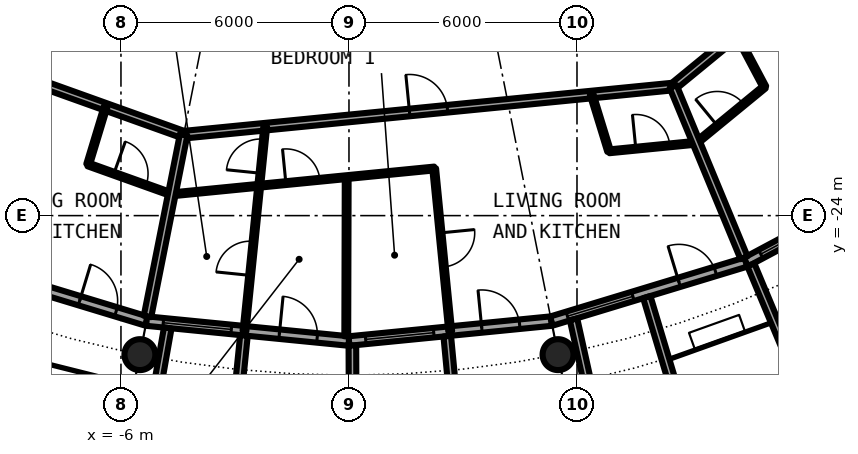
"""IFC4 building model, lengths in metres.
Left out: names, types, materials, properties, quantities, classifications, styles, units other than length and angle.
Written with IfcOpenShell. Run it as: python <this file> out.ifc"""

import sys

from ifc_helpers import new_model, si_unit, direction, frame, frame_2d, origin, origin_2d, place, context, subcontext, project, spatial, rectangle, hollow_circle, extrude, element, fill, save


model = new_model("IFC4")
c1 = context("Model", 3, precision=1e-05, world=origin(), true_north=direction((0.0, 1.0)))
c2 = subcontext(c1, "Body", "Model", "MODEL_VIEW")
j1 = project(units=[si_unit("LENGTHUNIT", "METRE"), si_unit("PLANEANGLEUNIT", "RADIAN")], contexts=[c1])
p1 = place(None, origin())
s1 = spatial("IfcSite", under=j1, at=p1, CompositionType="ELEMENT")
p2 = place(p1, origin())
s2 = spatial("IfcBuilding", under=s1, at=p2, CompositionType="ELEMENT")
p3 = place(p2, frame((0.0, 0.0, 202.4)))
s3 = spatial("IfcBuildingStorey", under=s2, at=p3, CompositionType="ELEMENT", Elevation=202.4)
for number, where, z_axis, x_axis in (
    (1, (-5.501, -27.658, 0.0), (0.0, 0.0, 1.0), (1.0, 0.0, 0.0)),
    (2, (5.501, -27.658, 0.0), (0.0, 0.0, 1.0), (1.0, 0.0, 0.0)),
):
    element("IfcColumn", number, at=place(p3, frame(where, z_axis=z_axis, x_axis=x_axis)), inside=s3, PredefinedType="COLUMN", context=c2, shape_type="SweptSolid", body=[
        extrude(hollow_circle(Radius=0.406, WallThickness=0.03, at=origin_2d()), origin(), (0.0, 0.0, 1.0), 3.05),
    ])
p4 = place(p3, frame((-10.447, -25.222, 0.0), z_axis=(0.0, 0.0, 1.0), x_axis=(0.956965678721, -0.290201119486, 0.0)))
e3 = element("IfcWall", 3, at=p4, inside=s3, PredefinedType="SOLIDWALL", context=c2, shape_type="SweptSolid", body=[
    extrude(rectangle(XDim=5.351, YDim=0.25, at=frame_2d((2.676, 0.0))), origin(), (0.0, 0.0, 1.0), 2.7),
])
p5 = place(p4, frame((0.441, 0.0, 0.3)))
e4 = element("IfcOpeningElement", 4, at=p5, cuts=e3, PredefinedType="OPENING", context=c2, shape_type="SweptSolid", body=[
    extrude(rectangle(XDim=1.8, YDim=2.1, at=frame_2d((0.9, 1.05))), frame((0.0, 0.135, 0.0), z_axis=(0.0, -1.0, 0.0), x_axis=(1.0, 0.0, 0.0)), (0.0, 0.0, 1.0), 0.27),
])
p6 = place(p4, frame((3.51, 0.0, 0.0)))
e5 = element("IfcOpeningElement", 5, at=p6, cuts=e3, PredefinedType="OPENING", context=c2, shape_type="SweptSolid", body=[
    extrude(rectangle(XDim=1.0, YDim=2.2, at=frame_2d((0.5, 1.1))), frame((0.0, 0.135, 0.0), z_axis=(0.0, -1.0, 0.0), x_axis=(1.0, 0.0, 0.0)), (0.0, 0.0, 1.0), 0.27),
])
p7 = place(p3, frame((-5.326, -26.775, 0.0), z_axis=(0.0, 0.0, 1.0), x_axis=(0.995173996315, -0.098126026407, 0.0)))
e6 = element("IfcWall", 6, at=p7, inside=s3, PredefinedType="SOLIDWALL", context=c2, shape_type="SweptSolid", body=[
    extrude(rectangle(XDim=5.352, YDim=0.25, at=frame_2d((2.676, 0.0))), origin(), (0.0, 0.0, 1.0), 2.7),
])
p8 = place(p7, frame((0.441, 0.0, 0.3)))
e7 = element("IfcOpeningElement", 7, at=p8, cuts=e6, PredefinedType="OPENING", context=c2, shape_type="SweptSolid", body=[
    extrude(rectangle(XDim=1.8, YDim=2.1, at=frame_2d((0.9, 1.05))), frame((0.0, 0.135, 0.0), z_axis=(0.0, -1.0, 0.0), x_axis=(1.0, 0.0, 0.0)), (0.0, 0.0, 1.0), 0.27),
])
p9 = place(p7, frame((3.51, 0.0, 0.0)))
e8 = element("IfcOpeningElement", 8, at=p9, cuts=e6, PredefinedType="OPENING", context=c2, shape_type="SweptSolid", body=[
    extrude(rectangle(XDim=1.0, YDim=2.2, at=frame_2d((0.5, 1.1))), frame((0.0, 0.135, 0.0), z_axis=(0.0, -1.0, 0.0), x_axis=(1.0, 0.0, 0.0)), (0.0, 0.0, 1.0), 0.27),
])
p10 = place(p3, frame((-4.769, -26.956, -0.03), z_axis=(0.0, 0.0, 1.0), x_axis=(-0.174056778901, -0.984735618183, 0.0)))
e9 = element("IfcWall", 9, at=p10, inside=s3, PredefinedType="SOLIDWALL", context=c2, shape_type="SweptSolid", body=[
    extrude(rectangle(XDim=2.925, YDim=0.2, at=frame_2d((1.462, 0.0))), origin(), (0.0, 0.0, 1.0), 2.73),
])
p11 = place(p3, frame((-2.764, -27.153, -0.03), z_axis=(0.0, 0.0, 1.0), x_axis=(-0.101505487237, -0.994834979311, 0.0)))
e10 = element("IfcWall", 10, at=p11, inside=s3, PredefinedType="SOLIDWALL", context=c2, shape_type="SweptSolid", body=[
    extrude(rectangle(XDim=3.007, YDim=0.2, at=frame_2d((1.503, 0.0))), origin(), (0.0, 0.0, 1.0), 2.73),
])
p12 = place(p3, frame((0.0, -27.3, 0.0), z_axis=(0.0, 0.0, 1.0), x_axis=(0.995173996315, 0.098126026407, 0.0)))
e11 = element("IfcWall", 11, at=p12, inside=s3, PredefinedType="SOLIDWALL", context=c2, shape_type="SweptSolid", body=[
    extrude(rectangle(XDim=5.352, YDim=0.25, at=frame_2d((2.676, 0.0))), origin(), (0.0, 0.0, 1.0), 2.7),
])
p13 = place(p12, frame((0.441, 0.0, 0.3)))
e12 = element("IfcOpeningElement", 12, at=p13, cuts=e11, PredefinedType="OPENING", context=c2, shape_type="SweptSolid", body=[
    extrude(rectangle(XDim=1.8, YDim=2.1, at=frame_2d((0.9, 1.05))), frame((0.0, 0.135, 0.0), z_axis=(0.0, -1.0, 0.0), x_axis=(1.0, 0.0, 0.0)), (0.0, 0.0, 1.0), 0.27),
])
p14 = place(p12, frame((3.51, 0.0, 0.0)))
e13 = element("IfcOpeningElement", 13, at=p14, cuts=e11, PredefinedType="OPENING", context=c2, shape_type="SweptSolid", body=[
    extrude(rectangle(XDim=1.0, YDim=2.2, at=frame_2d((0.5, 1.1))), frame((0.0, 0.135, 0.0), z_axis=(0.0, -1.0, 0.0), x_axis=(1.0, 0.0, 0.0)), (0.0, 0.0, 1.0), 0.27),
])
p15 = place(p3, frame((0.09, -27.417, -0.03), z_axis=(0.0, 0.0, 1.0), x_axis=(0.00347308367, -0.999993968827, 0.0)))
e14 = element("IfcWall", 14, at=p15, inside=s3, PredefinedType="SOLIDWALL", context=c2, shape_type="SweptSolid", body=[
    extrude(rectangle(XDim=2.882, YDim=0.2, at=frame_2d((1.441, 0.0))), origin(), (0.0, 0.0, 1.0), 2.73),
])
p16 = place(p3, frame((2.586, -27.171, -0.03), z_axis=(0.0, 0.0, 1.0), x_axis=(0.094548432284, -0.995520262954, 0.0)))
e15 = element("IfcWall", 15, at=p16, inside=s3, PredefinedType="SOLIDWALL", context=c2, shape_type="SweptSolid", body=[
    extrude(rectangle(XDim=3.006, YDim=0.2, at=frame_2d((1.503, 0.0))), origin(), (0.0, 0.0, 1.0), 2.73),
])
p17 = place(p3, frame((5.326, -26.775, 0.0), z_axis=(0.0, 0.0, 1.0), x_axis=(0.956965678721, 0.290201119486, 0.0)))
e16 = element("IfcWall", 16, at=p17, inside=s3, PredefinedType="SOLIDWALL", context=c2, shape_type="SweptSolid", body=[
    extrude(rectangle(XDim=5.351, YDim=0.25, at=frame_2d((2.676, 0.0))), origin(), (0.0, 0.0, 1.0), 2.7),
])
p18 = place(p17, frame((0.441, 0.0, 0.3)))
e17 = element("IfcOpeningElement", 17, at=p18, cuts=e16, PredefinedType="OPENING", context=c2, shape_type="SweptSolid", body=[
    extrude(rectangle(XDim=1.8, YDim=2.1, at=frame_2d((0.9, 1.05))), frame((0.0, 0.135, 0.0), z_axis=(0.0, -1.0, 0.0), x_axis=(1.0, 0.0, 0.0)), (0.0, 0.0, 1.0), 0.27),
])
p19 = place(p17, frame((3.51, 0.0, 0.0)))
e18 = element("IfcOpeningElement", 18, at=p19, cuts=e16, PredefinedType="OPENING", context=c2, shape_type="SweptSolid", body=[
    extrude(rectangle(XDim=1.0, YDim=2.2, at=frame_2d((0.5, 1.1))), frame((0.0, 0.135, 0.0), z_axis=(0.0, -1.0, 0.0), x_axis=(1.0, 0.0, 0.0)), (0.0, 0.0, 1.0), 0.27),
])
p20 = place(p3, frame((5.909, -26.729, -0.03), z_axis=(0.0, 0.0, 1.0), x_axis=(0.216409053917, -0.976302781612, 0.0)))
e19 = element("IfcWall", 19, at=p20, inside=s3, PredefinedType="SOLIDWALL", context=c2, shape_type="SweptSolid", body=[
    extrude(rectangle(XDim=2.925, YDim=0.2, at=frame_2d((1.463, 0.0))), origin(), (0.0, 0.0, 1.0), 2.73),
])
p21 = place(p3, frame((7.837, -26.144, -0.03), z_axis=(0.0, 0.0, 1.0), x_axis=(0.287064767992, -0.957911174889, 0.0)))
e20 = element("IfcWall", 20, at=p21, inside=s3, PredefinedType="SOLIDWALL", context=c2, shape_type="SweptSolid", body=[
    extrude(rectangle(XDim=3.006, YDim=0.2, at=frame_2d((1.503, 0.0))), origin(), (0.0, 0.0, 1.0), 2.73),
])
p22 = place(p3, frame((10.447, -25.222, 0.0), z_axis=(0.0, 0.0, 1.0), x_axis=(0.881915646801, 0.471407246368, 0.0)))
e21 = element("IfcWall", 21, at=p22, inside=s3, PredefinedType="SOLIDWALL", context=c2, shape_type="SweptSolid", body=[
    extrude(rectangle(XDim=5.352, YDim=0.25, at=frame_2d((2.676, 0.0))), origin(), (0.0, 0.0, 1.0), 2.7),
])
p23 = place(p22, frame((0.441, 0.0, 0.3)))
e22 = element("IfcOpeningElement", 22, at=p23, cuts=e21, PredefinedType="OPENING", context=c2, shape_type="SweptSolid", body=[
    extrude(rectangle(XDim=1.8, YDim=2.1, at=frame_2d((0.9, 1.05))), frame((0.0, 0.135, 0.0), z_axis=(0.0, -1.0, 0.0), x_axis=(1.0, 0.0, 0.0)), (0.0, 0.0, 1.0), 0.27),
])
p24 = place(p22, frame((3.51, 0.0, 0.0)))
e23 = element("IfcOpeningElement", 23, at=p24, cuts=e21, PredefinedType="OPENING", context=c2, shape_type="SweptSolid", body=[
    extrude(rectangle(XDim=1.0, YDim=2.2, at=frame_2d((0.5, 1.1))), frame((0.0, 0.135, 0.0), z_axis=(0.0, -1.0, 0.0), x_axis=(1.0, 0.0, 0.0)), (0.0, 0.0, 1.0), 0.27),
])
p25 = place(p3, frame((10.575, -25.295, -0.03), z_axis=(0.0, 0.0, 1.0), x_axis=(0.385697364644, -0.922625353492, 0.0)))
e24 = element("IfcWall", 24, at=p25, inside=s3, PredefinedType="SOLIDWALL", context=c2, shape_type="SweptSolid", body=[
    extrude(rectangle(XDim=2.883, YDim=0.2, at=frame_2d((1.442, 0.0))), origin(), (0.0, 0.0, 1.0), 2.73),
])
p26 = place(p3, frame((-6.864, -22.654, 0.0), z_axis=(0.0, 0.0, 1.0), x_axis=(0.941498294089, -0.337017747646, 0.0)))
e25 = element("IfcWall", 25, at=p26, inside=s3, PredefinedType="PARTITIONING", context=c2, shape_type="SweptSolid", body=[
    extrude(rectangle(XDim=2.338, YDim=0.1, at=frame_2d((1.169, 0.0))), origin(), (0.0, 0.0, 1.0), 2.7),
])
p27 = place(p26, frame((0.719, 0.0, 0.0)))
e26 = element("IfcOpeningElement", 26, at=p27, cuts=e25, PredefinedType="OPENING", context=c2, shape_type="SweptSolid", body=[
    extrude(rectangle(XDim=0.9, YDim=2.3, at=frame_2d((0.45, 1.15))), frame((0.0, 0.06, 0.0), z_axis=(0.0, -1.0, 0.0), x_axis=(1.0, 0.0, 0.0)), (0.0, 0.0, 1.0), 0.12),
])
p28 = place(p3, frame((-4.667, -23.441, 0.0), z_axis=(0.0, 0.0, 1.0), x_axis=(0.995185674562, 0.098007515761, 0.0)))
e27 = element("IfcWall", 27, at=p28, inside=s3, PredefinedType="PARTITIONING", context=c2, shape_type="SweptSolid", body=[
    extrude(rectangle(XDim=6.948, YDim=0.1, at=frame_2d((3.474, 0.0))), origin(), (0.0, 0.0, 1.0), 2.7),
])
p29 = place(p28, frame((3.021, 0.0, 0.0)))
e28 = element("IfcOpeningElement", 28, at=p29, cuts=e27, PredefinedType="OPENING", context=c2, shape_type="SweptSolid", body=[
    extrude(rectangle(XDim=0.9, YDim=2.3, at=frame_2d((0.45, 1.15))), frame((0.0, 0.06, 0.0), z_axis=(0.0, -1.0, 0.0), x_axis=(1.0, 0.0, 0.0)), (0.0, 0.0, 1.0), 0.12),
])
p30 = place(p3, frame((6.85, -22.308, 0.0), z_axis=(0.0, 0.0, 1.0), x_axis=(0.995161915602, 0.098248469375, 0.0)))
e29 = element("IfcWall", 29, at=p30, inside=s3, PredefinedType="PARTITIONING", context=c2, shape_type="SweptSolid", body=[
    extrude(rectangle(XDim=2.311, YDim=0.1, at=frame_2d((1.156, 0.0))), origin(), (0.0, 0.0, 1.0), 2.7),
])
p31 = place(p30, frame((0.701, 0.0, 0.0)))
e30 = element("IfcOpeningElement", 30, at=p31, cuts=e29, PredefinedType="OPENING", context=c2, shape_type="SweptSolid", body=[
    extrude(rectangle(XDim=0.9, YDim=2.3, at=frame_2d((0.45, 1.15))), frame((0.0, 0.06, 0.0), z_axis=(0.0, -1.0, 0.0), x_axis=(1.0, 0.0, 0.0)), (0.0, 0.0, 1.0), 0.12),
])
p32 = place(p3, frame((9.146, -22.081, 0.0), z_axis=(0.0, 0.0, 1.0), x_axis=(0.773095932958, 0.634289112663, 0.0)))
e31 = element("IfcWall", 31, at=p32, inside=s3, PredefinedType="PARTITIONING", context=c2, shape_type="SweptSolid", body=[
    extrude(rectangle(XDim=2.313, YDim=0.1, at=frame_2d((1.156, 0.0))), origin(), (0.0, 0.0, 1.0), 2.7),
])
p33 = place(p32, frame((0.706, 0.0, 0.0)))
e32 = element("IfcOpeningElement", 32, at=p33, cuts=e31, PredefinedType="OPENING", context=c2, shape_type="SweptSolid", body=[
    extrude(rectangle(XDim=0.9, YDim=2.3, at=frame_2d((0.45, 1.15))), frame((0.0, 0.06, 0.0), z_axis=(0.0, -1.0, 0.0), x_axis=(1.0, 0.0, 0.0)), (0.0, 0.0, 1.0), 0.12),
])
p34 = place(p3, frame((-10.512, -19.667, 0.0), z_axis=(0.0, 0.0, 1.0), x_axis=(0.941518972512, -0.336959974478, 0.0)))
e33 = element("IfcWall", 33, at=p34, inside=s3, PredefinedType="PARTITIONING", context=c2, shape_type="SweptSolid", body=[
    extrude(rectangle(XDim=6.547, YDim=0.2, at=frame_2d((3.273, 0.0))), origin(), (0.0, 0.0, 1.0), 2.7),
])
p35 = place(p34, frame((1.682, 0.0, 0.0)))
e34 = element("IfcOpeningElement", 34, at=p35, cuts=e33, PredefinedType="OPENING", context=c2, shape_type="SweptSolid", body=[
    extrude(rectangle(XDim=1.0, YDim=2.3, at=frame_2d((0.5, 1.15))), frame((0.0, 0.11, 0.0), z_axis=(0.0, -1.0, 0.0), x_axis=(1.0, 0.0, 0.0)), (0.0, 0.0, 1.0), 0.22),
])
p36 = place(p3, frame((-4.355, -21.872, 0.0), z_axis=(0.0, 0.0, 1.0), x_axis=(0.995184945277, 0.098014920772, 0.0)))
e35 = element("IfcWall", 35, at=p36, inside=s3, PredefinedType="PARTITIONING", context=c2, shape_type="SweptSolid", body=[
    extrude(rectangle(XDim=12.958, YDim=0.2, at=frame_2d((6.479, 0.0))), origin(), (0.0, 0.0, 1.0), 2.7),
])
p37 = place(p36, frame((5.978, 0.0, 0.0)))
e36 = element("IfcOpeningElement", 36, at=p37, cuts=e35, PredefinedType="OPENING", context=c2, shape_type="SweptSolid", body=[
    extrude(rectangle(XDim=1.0, YDim=2.3, at=frame_2d((0.5, 1.15))), frame((0.0, 0.11, 0.0), z_axis=(0.0, -1.0, 0.0), x_axis=(1.0, 0.0, 0.0)), (0.0, 0.0, 1.0), 0.22),
])
p38 = place(p3, frame((8.534, -20.603, 0.0), z_axis=(0.0, 0.0, 1.0), x_axis=(0.772983503654, 0.634426121056, 0.0)))
e37 = element("IfcWall", 37, at=p38, inside=s3, PredefinedType="PARTITIONING", context=c2, shape_type="SweptSolid", body=[
    extrude(rectangle(XDim=12.947, YDim=0.2, at=frame_2d((6.474, 0.0))), origin(), (0.0, 0.0, 1.0), 2.7),
])
p39 = place(p38, frame((5.974, 0.0, 0.0)))
e38 = element("IfcOpeningElement", 38, at=p39, cuts=e37, PredefinedType="OPENING", context=c2, shape_type="SweptSolid", body=[
    extrude(rectangle(XDim=1.0, YDim=2.3, at=frame_2d((0.5, 1.15))), frame((0.0, 0.11, 0.0), z_axis=(0.0, -1.0, 0.0), x_axis=(1.0, 0.0, 0.0)), (0.0, 0.0, 1.0), 0.22),
])
p40 = place(p3, frame((-6.864, -22.653, 0.0), z_axis=(0.0, 0.0, 1.0), x_axis=(0.290315311421, 0.956931042424, 0.0)))
e39 = element("IfcWall", 39, at=p40, inside=s3, PredefinedType="PARTITIONING", context=c2, shape_type="SweptSolid", body=[
    extrude(rectangle(XDim=1.584, YDim=0.1, at=frame_2d((0.792, 0.0))), origin(), (0.0, 0.0, 1.0), 2.7),
])
p41 = place(p3, frame((6.386, -20.814, 0.0), z_axis=(0.0, 0.0, 1.0), x_axis=(0.293866159639, -0.955846577762, 0.0)))
e40 = element("IfcWall", 40, at=p41, inside=s3, PredefinedType="PARTITIONING", context=c2, shape_type="SweptSolid", body=[
    extrude(rectangle(XDim=1.562, YDim=0.1, at=frame_2d((0.781, 0.0))), origin(), (0.0, 0.0, 1.0), 2.7),
])
p42 = place(p3, frame((-5.302, -26.653, 0.0), z_axis=(0.0, 0.0, 1.0), x_axis=(0.195075825861, 0.980788163756, 0.0)))
e41 = element("IfcWall", 41, at=p42, inside=s3, PredefinedType="PARTITIONING", context=c2, shape_type="SweptSolid", body=[
    extrude(rectangle(XDim=4.875, YDim=0.2, at=frame_2d((2.438, 0.0))), origin(), (0.0, 0.0, 1.0), 2.7),
])
p43 = place(p3, frame((-2.75, -27.036, 0.0), z_axis=(0.0, 0.0, 1.0), x_axis=(0.101248136141, 0.994861203851, 0.0)))
e42 = element("IfcWall", 42, at=p43, inside=s3, PredefinedType="PARTITIONING", context=c2, shape_type="SweptSolid", body=[
    extrude(rectangle(XDim=5.404, YDim=0.1, at=frame_2d((2.702, 0.0))), origin(), (0.0, 0.0, 1.0), 2.7),
])
p44 = place(p43, frame((4.173, 0.0, 0.0)))
e43 = element("IfcOpeningElement", 43, at=p44, cuts=e42, PredefinedType="OPENING", context=c2, shape_type="SweptSolid", body=[
    extrude(rectangle(XDim=0.9, YDim=2.3, at=frame_2d((0.45, 1.15))), frame((0.0, 0.06, 0.0), z_axis=(0.0, -1.0, 0.0), x_axis=(1.0, 0.0, 0.0)), (0.0, 0.0, 1.0), 0.12),
])
p45 = place(p43, frame((1.471, 0.0, 0.0)))
e44 = element("IfcOpeningElement", 44, at=p45, cuts=e42, PredefinedType="OPENING", context=c2, shape_type="SweptSolid", body=[
    extrude(rectangle(XDim=0.9, YDim=2.3, at=frame_2d((0.45, 1.15))), frame((0.0, 0.06, 0.0), z_axis=(0.0, -1.0, 0.0), x_axis=(1.0, 0.0, 0.0)), (0.0, 0.0, 1.0), 0.12),
])
p46 = place(p3, frame((-0.071, -27.175, 0.0), z_axis=(0.0, 0.0, 1.0), x_axis=(0.002623285832, 0.99999655918, 0.0)))
e45 = element("IfcWall", 45, at=p46, inside=s3, PredefinedType="PARTITIONING", context=c2, shape_type="SweptSolid", body=[
    extrude(rectangle(XDim=4.188, YDim=0.1, at=frame_2d((2.094, 0.0))), origin(), (0.0, 0.0, 1.0), 2.7),
])
p47 = place(p3, frame((2.242, -22.761, 0.0), z_axis=(0.0, 0.0, 1.0), x_axis=(0.098082610705, -0.995178276229, 0.0)))
e46 = element("IfcWall", 46, at=p47, inside=s3, PredefinedType="PARTITIONING", context=c2, shape_type="SweptSolid", body=[
    extrude(rectangle(XDim=4.304, YDim=0.1, at=frame_2d((2.152, 0.0))), origin(), (0.0, 0.0, 1.0), 2.7),
])
p48 = place(p47, frame((1.702, 0.0, 0.0)))
e47 = element("IfcOpeningElement", 47, at=p48, cuts=e46, PredefinedType="OPENING", context=c2, shape_type="SweptSolid", body=[
    extrude(rectangle(XDim=0.9, YDim=2.3, at=frame_2d((0.45, 1.15))), frame((0.0, 0.06, 0.0), z_axis=(0.0, -1.0, 0.0), x_axis=(1.0, 0.0, 0.0)), (0.0, 0.0, 1.0), 0.12),
])
p49 = place(p3, frame((8.53, -20.605, 0.0), z_axis=(0.0, 0.0, 1.0), x_axis=(0.382651153718, -0.923892902104, 0.0)))
e48 = element("IfcWall", 48, at=p49, inside=s3, PredefinedType="PARTITIONING", context=c2, shape_type="SweptSolid", body=[
    extrude(rectangle(XDim=4.874, YDim=0.2, at=frame_2d((2.437, 0.0))), origin(), (0.0, 0.0, 1.0), 2.7),
])
p50 = place(p3, frame((10.202, -19.234, 0.0), z_axis=(0.0, 0.0, 1.0), x_axis=(0.468648615763, -0.88338466986, 0.0)))
e49 = element("IfcWall", 49, at=p50, inside=s3, PredefinedType="PARTITIONING", context=c2, shape_type="SweptSolid", body=[
    extrude(rectangle(XDim=1.562, YDim=0.1, at=frame_2d((0.781, 0.0))), origin(), (0.0, 0.0, 1.0), 2.7),
])
p51 = place(p6, origin())
e50 = element("IfcDoor", 50, at=p51, inside=s3, OperationType="SINGLE_SWING_LEFT", PredefinedType="DOOR", context=c2, shape_type="SweptSolid", body=[
    extrude(rectangle(XDim=1.0, YDim=2.2, at=frame_2d((0.5, 1.1))), frame((0.0, 0.025, 0.0), z_axis=(0.0, -1.0, 0.0), x_axis=(1.0, 0.0, 0.0)), (0.0, 0.0, 1.0), 0.05),
])
fill(e5, e50)
p52 = place(p8, origin())
e51 = element("IfcWindow", 51, at=p52, inside=s3, PartitioningType="SINGLE_PANEL", PredefinedType="WINDOW", context=c2, shape_type="SweptSolid", body=[
    extrude(rectangle(XDim=1.8, YDim=2.1, at=frame_2d((0.9, 1.05))), frame((0.0, 0.03, 0.0), z_axis=(0.0, -1.0, 0.0), x_axis=(1.0, 0.0, 0.0)), (0.0, 0.0, 1.0), 0.06),
])
fill(e7, e51)
p53 = place(p9, origin())
e52 = element("IfcDoor", 52, at=p53, inside=s3, OperationType="SINGLE_SWING_LEFT", PredefinedType="DOOR", context=c2, shape_type="SweptSolid", body=[
    extrude(rectangle(XDim=1.0, YDim=2.2, at=frame_2d((0.5, 1.1))), frame((0.0, 0.025, 0.0), z_axis=(0.0, -1.0, 0.0), x_axis=(1.0, 0.0, 0.0)), (0.0, 0.0, 1.0), 0.05),
])
fill(e8, e52)
p54 = place(p13, origin())
e53 = element("IfcWindow", 53, at=p54, inside=s3, PartitioningType="SINGLE_PANEL", PredefinedType="WINDOW", context=c2, shape_type="SweptSolid", body=[
    extrude(rectangle(XDim=1.8, YDim=2.1, at=frame_2d((0.9, 1.05))), frame((0.0, 0.03, 0.0), z_axis=(0.0, -1.0, 0.0), x_axis=(1.0, 0.0, 0.0)), (0.0, 0.0, 1.0), 0.06),
])
fill(e12, e53)
p55 = place(p14, origin())
e54 = element("IfcDoor", 54, at=p55, inside=s3, OperationType="SINGLE_SWING_LEFT", PredefinedType="DOOR", context=c2, shape_type="SweptSolid", body=[
    extrude(rectangle(XDim=1.0, YDim=2.2, at=frame_2d((0.5, 1.1))), frame((0.0, 0.025, 0.0), z_axis=(0.0, -1.0, 0.0), x_axis=(1.0, 0.0, 0.0)), (0.0, 0.0, 1.0), 0.05),
])
fill(e13, e54)
p56 = place(p18, origin())
e55 = element("IfcWindow", 55, at=p56, inside=s3, PartitioningType="SINGLE_PANEL", PredefinedType="WINDOW", context=c2, shape_type="SweptSolid", body=[
    extrude(rectangle(XDim=1.8, YDim=2.1, at=frame_2d((0.9, 1.05))), frame((0.0, 0.03, 0.0), z_axis=(0.0, -1.0, 0.0), x_axis=(1.0, 0.0, 0.0)), (0.0, 0.0, 1.0), 0.06),
])
fill(e17, e55)
p57 = place(p19, origin())
e56 = element("IfcDoor", 56, at=p57, inside=s3, OperationType="SINGLE_SWING_LEFT", PredefinedType="DOOR", context=c2, shape_type="SweptSolid", body=[
    extrude(rectangle(XDim=1.0, YDim=2.2, at=frame_2d((0.5, 1.1))), frame((0.0, 0.025, 0.0), z_axis=(0.0, -1.0, 0.0), x_axis=(1.0, 0.0, 0.0)), (0.0, 0.0, 1.0), 0.05),
])
fill(e18, e56)
p58 = place(p23, origin())
e57 = element("IfcWindow", 57, at=p58, inside=s3, PartitioningType="SINGLE_PANEL", PredefinedType="WINDOW", context=c2, shape_type="SweptSolid", body=[
    extrude(rectangle(XDim=1.8, YDim=2.1, at=frame_2d((0.9, 1.05))), frame((0.0, 0.03, 0.0), z_axis=(0.0, -1.0, 0.0), x_axis=(1.0, 0.0, 0.0)), (0.0, 0.0, 1.0), 0.06),
])
fill(e22, e57)
p59 = place(p27, origin())
e58 = element("IfcDoor", 58, at=p59, inside=s3, OperationType="SINGLE_SWING_LEFT", PredefinedType="DOOR", context=c2, shape_type="SweptSolid", body=[
    extrude(rectangle(XDim=0.9, YDim=2.3, at=frame_2d((0.45, 1.15))), frame((0.0, 0.025, 0.0), z_axis=(0.0, -1.0, 0.0), x_axis=(1.0, 0.0, 0.0)), (0.0, 0.0, 1.0), 0.05),
])
fill(e26, e58)
p60 = place(p37, origin())
e59 = element("IfcDoor", 59, at=p60, inside=s3, OperationType="SINGLE_SWING_LEFT", PredefinedType="DOOR", context=c2, shape_type="SweptSolid", body=[
    extrude(rectangle(XDim=1.0, YDim=2.3, at=frame_2d((0.5, 1.15))), frame((0.0, 0.025, 0.0), z_axis=(0.0, -1.0, 0.0), x_axis=(1.0, 0.0, 0.0)), (0.0, 0.0, 1.0), 0.05),
])
fill(e36, e59)
p61 = place(p31, origin())
e60 = element("IfcDoor", 60, at=p61, inside=s3, OperationType="SINGLE_SWING_LEFT", PredefinedType="DOOR", context=c2, shape_type="SweptSolid", body=[
    extrude(rectangle(XDim=0.9, YDim=2.3, at=frame_2d((0.45, 1.15))), frame((0.0, 0.025, 0.0), z_axis=(0.0, -1.0, 0.0), x_axis=(1.0, 0.0, 0.0)), (0.0, 0.0, 1.0), 0.05),
])
fill(e30, e60)
p62 = place(p44, origin())
e61 = element("IfcDoor", 61, at=p62, inside=s3, OperationType="SINGLE_SWING_RIGHT", PredefinedType="DOOR", context=c2, shape_type="SweptSolid", body=[
    extrude(rectangle(XDim=0.9, YDim=2.3, at=frame_2d((0.45, 1.15))), frame((0.0, 0.025, 0.0), z_axis=(0.0, -1.0, 0.0), x_axis=(1.0, 0.0, 0.0)), (0.0, 0.0, 1.0), 0.05),
])
fill(e43, e61)
p63 = place(p48, origin())
e62 = element("IfcDoor", 62, at=p63, inside=s3, OperationType="SINGLE_SWING_LEFT", PredefinedType="DOOR", context=c2, shape_type="SweptSolid", body=[
    extrude(rectangle(XDim=0.9, YDim=2.3, at=frame_2d((0.45, 1.15))), frame((0.0, 0.025, 0.0), z_axis=(0.0, -1.0, 0.0), x_axis=(1.0, 0.0, 0.0)), (0.0, 0.0, 1.0), 0.05),
])
fill(e47, e62)
p64 = place(p29, origin())
e63 = element("IfcDoor", 63, at=p64, inside=s3, OperationType="SINGLE_SWING_LEFT", PredefinedType="DOOR", context=c2, shape_type="SweptSolid", body=[
    extrude(rectangle(XDim=0.9, YDim=2.3, at=frame_2d((0.45, 1.15))), frame((0.0, 0.025, 0.0), z_axis=(0.0, -1.0, 0.0), x_axis=(1.0, 0.0, 0.0)), (0.0, 0.0, 1.0), 0.05),
])
fill(e28, e63)
p65 = place(p45, origin())
e64 = element("IfcDoor", 64, at=p65, inside=s3, OperationType="SINGLE_SWING_LEFT", PredefinedType="DOOR", context=c2, shape_type="SweptSolid", body=[
    extrude(rectangle(XDim=0.9, YDim=2.3, at=frame_2d((0.45, 1.15))), frame((0.0, 0.025, 0.0), z_axis=(0.0, -1.0, 0.0), x_axis=(1.0, 0.0, 0.0)), (0.0, 0.0, 1.0), 0.05),
])
fill(e44, e64)
p66 = place(p33, origin())
e65 = element("IfcDoor", 65, at=p66, inside=s3, OperationType="SINGLE_SWING_LEFT", PredefinedType="DOOR", context=c2, shape_type="SweptSolid", body=[
    extrude(rectangle(XDim=0.9, YDim=2.3, at=frame_2d((0.45, 1.15))), frame((0.0, 0.025, 0.0), z_axis=(0.0, -1.0, 0.0), x_axis=(1.0, 0.0, 0.0)), (0.0, 0.0, 1.0), 0.05),
])
fill(e32, e65)
save(model, sys.argv[1])
